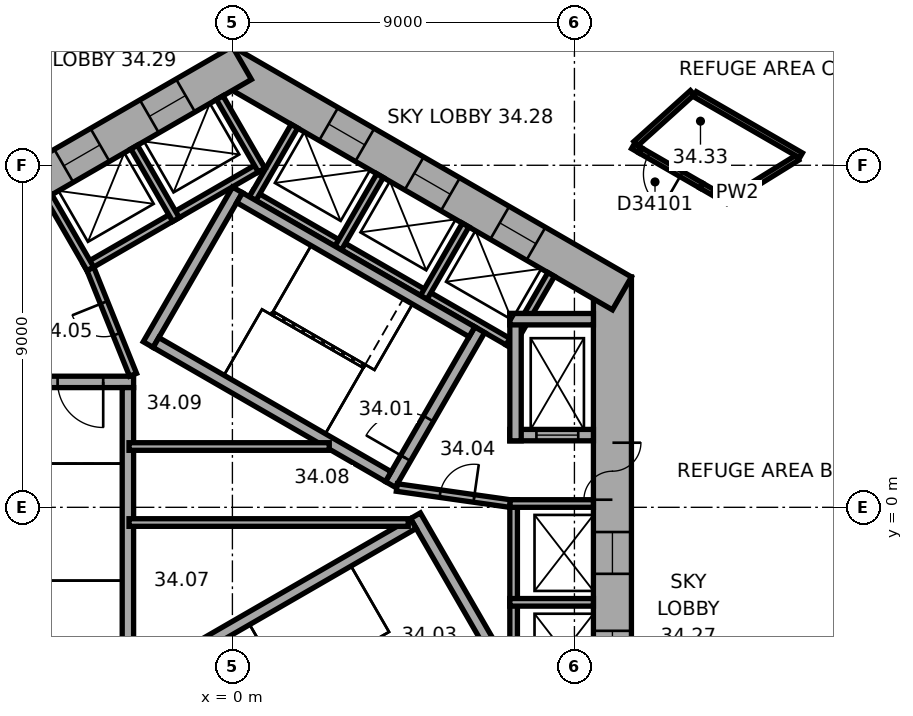
"""IFC4 building model, lengths in metres.
Left out: names, types, materials, properties, quantities, classifications, styles, units other than length and angle.
Written with IfcOpenShell. Run it as: python <this file> out.ifc"""

import sys

from ifc_helpers import new_model, si_unit, direction, frame, frame_2d, origin, place, context, subcontext, project, spatial, rectangle, extrude, element, fill, save


model = new_model("IFC4")
c1 = context("Model", 3, precision=1e-05, world=origin(), true_north=direction((0.0, 1.0)))
c2 = subcontext(c1, "Body", "Model", "MODEL_VIEW")
j1 = project(units=[si_unit("LENGTHUNIT", "METRE"), si_unit("PLANEANGLEUNIT", "RADIAN")], contexts=[c1])
p1 = place(None, origin())
s1 = spatial("IfcSite", under=j1, at=p1, CompositionType="ELEMENT")
p2 = place(p1, origin())
s2 = spatial("IfcBuilding", under=s1, at=p2, CompositionType="ELEMENT")
p3 = place(p2, frame((0.0, 0.0, 139.2)))
s3 = spatial("IfcBuildingStorey", under=s2, at=p3, CompositionType="ELEMENT", Elevation=139.2)
p4 = place(p3, frame((10.0, -6.062, 0.0), z_axis=(0.0, 0.0, 1.0), x_axis=(0.0, 1.0, 0.0)))
e1 = element("IfcWall", 1, at=p4, inside=s3, PredefinedType="SHEAR", context=c2, shape_type="SweptSolid", body=[
    extrude(rectangle(XDim=12.125, YDim=1.0, at=frame_2d((6.062, 0.0))), origin(), (0.0, 0.0, 1.0), 7.4),
])
p5 = place(p4, frame((6.262, 0.0, 0.0)))
e2 = element("IfcOpeningElement", 2, at=p5, cuts=e1, PredefinedType="OPENING", context=c2, shape_type="SweptSolid", body=[
    extrude(rectangle(XDim=1.5, YDim=2.1, at=frame_2d((0.75, 1.05))), frame((0.0, 0.51, 0.0), z_axis=(0.0, -1.0, 0.0), x_axis=(1.0, 0.0, 0.0)), (0.0, 0.0, 1.0), 1.02),
])
p6 = place(p4, frame((1.712, 0.0, 0.0)))
e3 = element("IfcOpeningElement", 3, at=p6, cuts=e1, PredefinedType="OPENING", context=c2, shape_type="SweptSolid", body=[
    extrude(rectangle(XDim=1.1, YDim=2.1, at=frame_2d((0.55, 1.05))), frame((0.0, 0.51, 0.0), z_axis=(0.0, -1.0, 0.0), x_axis=(1.0, 0.0, 0.0)), (0.0, 0.0, 1.0), 1.02),
])
p7 = place(p4, frame((4.312, 0.0, 0.0)))
e4 = element("IfcOpeningElement", 4, at=p7, cuts=e1, PredefinedType="OPENING", context=c2, shape_type="SweptSolid", body=[
    extrude(rectangle(XDim=1.1, YDim=2.1, at=frame_2d((0.55, 1.05))), frame((0.0, 0.51, 0.0), z_axis=(0.0, -1.0, 0.0), x_axis=(1.0, 0.0, 0.0)), (0.0, 0.0, 1.0), 1.02),
])
p8 = place(p3, frame((10.25, 5.629, 0.0), z_axis=(0.0, 0.0, 1.0), x_axis=(-0.866022616891, 0.50000482701, 0.0)))
e5 = element("IfcWall", 5, at=p8, inside=s3, PredefinedType="SHEAR", context=c2, shape_type="SweptSolid", body=[
    extrude(rectangle(XDim=12.125, YDim=1.0, at=frame_2d((6.062, 0.0))), origin(), (0.0, 0.0, 1.0), 7.4),
])
p9 = place(p8, frame((2.612, 0.0, 0.0)))
e6 = element("IfcOpeningElement", 6, at=p9, cuts=e5, PredefinedType="OPENING", context=c2, shape_type="SweptSolid", body=[
    extrude(rectangle(XDim=1.1, YDim=2.1, at=frame_2d((0.55, 1.05))), frame((0.0, 0.51, 0.0), z_axis=(0.0, -1.0, 0.0), x_axis=(1.0, 0.0, 0.0)), (0.0, 0.0, 1.0), 1.02),
])
p10 = place(p8, frame((5.212, 0.0, 0.0)))
e7 = element("IfcOpeningElement", 7, at=p10, cuts=e5, PredefinedType="OPENING", context=c2, shape_type="SweptSolid", body=[
    extrude(rectangle(XDim=1.1, YDim=2.1, at=frame_2d((0.55, 1.05))), frame((0.0, 0.51, 0.0), z_axis=(0.0, -1.0, 0.0), x_axis=(1.0, 0.0, 0.0)), (0.0, 0.0, 1.0), 1.02),
])
p11 = place(p8, frame((7.812, 0.0, 0.0)))
e8 = element("IfcOpeningElement", 8, at=p11, cuts=e5, PredefinedType="OPENING", context=c2, shape_type="SweptSolid", body=[
    extrude(rectangle(XDim=1.1, YDim=2.1, at=frame_2d((0.55, 1.05))), frame((0.0, 0.51, 0.0), z_axis=(0.0, -1.0, 0.0), x_axis=(1.0, 0.0, 0.0)), (0.0, 0.0, 1.0), 1.02),
])
p12 = place(p3, frame((0.25, 11.691, 0.0), z_axis=(0.0, 0.0, 1.0), x_axis=(-0.866022616891, -0.50000482701, 0.0)))
e9 = element("IfcWall", 9, at=p12, inside=s3, PredefinedType="SHEAR", context=c2, shape_type="SweptSolid", body=[
    extrude(rectangle(XDim=12.125, YDim=1.0, at=frame_2d((6.062, 0.0))), origin(), (0.0, 0.0, 1.0), 7.4),
])
p13 = place(p12, frame((6.262, 0.0, 0.0)))
e10 = element("IfcOpeningElement", 10, at=p13, cuts=e9, PredefinedType="OPENING", context=c2, shape_type="SweptSolid", body=[
    extrude(rectangle(XDim=1.5, YDim=2.1, at=frame_2d((0.75, 1.05))), frame((0.0, 0.51, 0.0), z_axis=(0.0, -1.0, 0.0), x_axis=(1.0, 0.0, 0.0)), (0.0, 0.0, 1.0), 1.02),
])
p14 = place(p12, frame((1.712, 0.0, 0.0)))
e11 = element("IfcOpeningElement", 11, at=p14, cuts=e9, PredefinedType="OPENING", context=c2, shape_type="SweptSolid", body=[
    extrude(rectangle(XDim=1.1, YDim=2.1, at=frame_2d((0.55, 1.05))), frame((0.0, 0.51, 0.0), z_axis=(0.0, -1.0, 0.0), x_axis=(1.0, 0.0, 0.0)), (0.0, 0.0, 1.0), 1.02),
])
p15 = place(p12, frame((4.312, 0.0, 0.0)))
e12 = element("IfcOpeningElement", 12, at=p15, cuts=e9, PredefinedType="OPENING", context=c2, shape_type="SweptSolid", body=[
    extrude(rectangle(XDim=1.1, YDim=2.1, at=frame_2d((0.55, 1.05))), frame((0.0, 0.51, 0.0), z_axis=(0.0, -1.0, 0.0), x_axis=(1.0, 0.0, 0.0)), (0.0, 0.0, 1.0), 1.02),
])
p16 = place(p3, frame((-15.687, 8.062, 0.0), z_axis=(0.0, 0.0, 1.0), x_axis=(0.856487923842, 0.516167062406, 0.0)))
e13 = element("IfcWall", 13, at=p16, inside=s3, PredefinedType="STANDARD", context=c2, shape_type="SweptSolid", body=[
    extrude(rectangle(XDim=15.973, YDim=0.15, at=frame_2d((7.987, 0.0))), origin(), (0.0, 0.0, 1.0), 2.6),
])
p17 = place(p16, frame((3.093, 0.0, 0.0)))
e14 = element("IfcOpeningElement", 14, at=p17, cuts=e13, PredefinedType="OPENING", context=c2, shape_type="SweptSolid", body=[
    extrude(rectangle(XDim=1.8, YDim=2.4, at=frame_2d((0.9, 1.2))), frame((0.0, 0.085, 0.0), z_axis=(0.0, -1.0, 0.0), x_axis=(1.0, 0.0, 0.0)), (0.0, 0.0, 1.0), 0.17),
])
p18 = place(p16, frame((11.08, 0.0, 0.0)))
e15 = element("IfcOpeningElement", 15, at=p18, cuts=e13, PredefinedType="OPENING", context=c2, shape_type="SweptSolid", body=[
    extrude(rectangle(XDim=1.8, YDim=2.4, at=frame_2d((0.9, 1.2))), frame((0.0, 0.085, 0.0), z_axis=(0.0, -1.0, 0.0), x_axis=(1.0, 0.0, 0.0)), (0.0, 0.0, 1.0), 0.17),
])
p19 = place(p3, frame((7.4, -5.2, 0.0), z_axis=(0.0, 0.0, 1.0), x_axis=(0.0, 1.0, 0.0)))
e16 = element("IfcWall", 16, at=p19, inside=s3, PredefinedType="PARTITIONING", context=c2, shape_type="SweptSolid", body=[
    extrude(rectangle(XDim=5.4, YDim=0.2, at=frame_2d((2.7, 0.0))), origin(), (0.0, 0.0, 1.0), 7.12),
])
for number, where, z_axis, x_axis in (
    (17, (7.3, -2.5, 0.0), (0.0, 0.0, 1.0), (1.0, 0.0, 0.0)),
    (18, (7.3, 0.1, 0.0), (0.0, 0.0, 1.0), (1.0, 0.0, 0.0)),
):
    element("IfcWall", number, at=place(p3, frame(where, z_axis=z_axis, x_axis=x_axis)), inside=s3, PredefinedType="PARTITIONING", context=c2, shape_type="SweptSolid", body=[
        extrude(rectangle(XDim=2.2, YDim=0.2, at=frame_2d((1.1, 0.0))), origin(), (0.0, 0.0, 1.0), 7.12),
    ])
p20 = place(p3, frame((7.424, 4.259, 0.0), z_axis=(0.0, 0.0, 1.0), x_axis=(-0.866026010844, 0.49999894854, 0.0)))
e19 = element("IfcWall", 19, at=p20, inside=s3, PredefinedType="PARTITIONING", context=c2, shape_type="SweptSolid", body=[
    extrude(rectangle(XDim=8.0, YDim=0.2, at=frame_2d((4.0, 0.0))), origin(), (0.0, 0.0, 1.0), 7.12),
])
for number, where, z_axis, x_axis in (
    (20, (7.287, 4.222, 0.0), (0.0, 0.0, 1.0), (0.5, 0.866, 0.0)),
    (21, (5.036, 5.522, 0.0), (0.0, 0.0, 1.0), (0.5, 0.866, 0.0)),
    (22, (2.784, 6.822, 0.0), (0.0, 0.0, 1.0), (0.5, 0.866, 0.0)),
    (23, (0.532, 8.122, 0.0), (0.0, 0.0, 1.0), (0.5, 0.866, 0.0)),
):
    element("IfcWall", number, at=place(p3, frame(where, z_axis=z_axis, x_axis=x_axis)), inside=s3, PredefinedType="PARTITIONING", context=c2, shape_type="SweptSolid", body=[
        extrude(rectangle(XDim=2.2, YDim=0.2, at=frame_2d((1.1, 0.0))), origin(), (0.0, 0.0, 1.0), 7.12),
    ])
p21 = place(p3, frame((0.803, 9.009, 0.0), z_axis=(0.0, 0.0, 1.0), x_axis=(-0.866028230842, -0.499995103361, 0.0)))
e24 = element("IfcWall", 24, at=p21, inside=s3, PredefinedType="PARTITIONING", context=c2, shape_type="SweptSolid", body=[
    extrude(rectangle(XDim=5.4, YDim=0.2, at=frame_2d((2.7, 0.0))), origin(), (0.0, 0.0, 1.0), 7.12),
])
p22 = place(p3, frame((0.767, 8.872, 0.0), z_axis=(0.0, 0.0, 1.0), x_axis=(-0.499994660107, 0.866028486751, 0.0)))
e25 = element("IfcWall", 25, at=p22, inside=s3, PredefinedType="PARTITIONING", context=c2, shape_type="SweptSolid", body=[
    extrude(rectangle(XDim=2.2, YDim=0.2, at=frame_2d((1.1, 0.0))), origin(), (0.0, 0.0, 1.0), 7.12),
])
for number, where, z_axis, x_axis in (
    (26, (-1.485, 7.572, 0.0), (0.0, 0.0, 1.0), (-0.5, 0.866, 0.0)),
    (27, (-3.737, 6.272, 0.0), (0.0, 0.0, 1.0), (-0.5, 0.866, 0.0)),
):
    element("IfcWall", number, at=place(p3, frame(where, z_axis=z_axis, x_axis=x_axis)), inside=s3, PredefinedType="PARTITIONING", context=c2, shape_type="SweptSolid", body=[
        extrude(rectangle(XDim=2.2, YDim=0.2, at=frame_2d((1.1, 0.0))), origin(), (0.0, 0.0, 1.0), 7.12),
    ])
p23 = place(p3, frame((4.158, 0.602, 0.0), z_axis=(0.0, 0.0, 1.0), x_axis=(0.499977259774, 0.866038532462, 0.0)))
e28 = element("IfcWall", 28, at=p23, inside=s3, PredefinedType="SHEAR", context=c2, shape_type="SweptSolid", body=[
    extrude(rectangle(XDim=4.7, YDim=0.3, at=frame_2d((2.35, 0.0))), origin(), (0.0, 0.0, 1.0), 7.12),
])
p24 = place(p23, frame((0.8, 0.0, 0.0)))
e29 = element("IfcOpeningElement", 29, at=p24, cuts=e28, PredefinedType="OPENING", context=c2, shape_type="SweptSolid", body=[
    extrude(rectangle(XDim=1.2, YDim=2.1, at=frame_2d((0.6, 1.05))), frame((0.0, 0.16, 0.0), z_axis=(0.0, -1.0, 0.0), x_axis=(1.0, 0.0, 0.0)), (0.0, 0.0, 1.0), 0.32),
])
p25 = place(p3, frame((-2.216, 4.282, 0.0), z_axis=(0.0, 0.0, 1.0), x_axis=(0.499977259774, 0.866038532462, 0.0)))
e30 = element("IfcWall", 30, at=p25, inside=s3, PredefinedType="SHEAR", context=c2, shape_type="SweptSolid", body=[
    extrude(rectangle(XDim=4.7, YDim=0.3, at=frame_2d((2.35, 0.0))), origin(), (0.0, 0.0, 1.0), 7.12),
])
for number, where, z_axis, x_axis in (
    (31, (4.103, 0.807, 0.0), (0.0, 0.0, 1.0), (-0.866, 0.5, 0.0)),
    (32, (6.303, 4.617, 0.0), (0.0, 0.0, 1.0), (-0.866, 0.5, 0.0)),
):
    element("IfcWall", number, at=place(p3, frame(where, z_axis=z_axis, x_axis=x_axis)), inside=s3, PredefinedType="SHEAR", context=c2, shape_type="SweptSolid", body=[
        extrude(rectangle(XDim=7.06, YDim=0.3, at=frame_2d((3.53, 0.0))), origin(), (0.0, 0.0, 1.0), 7.12),
    ])
p26 = place(p3, frame((-2.6, 3.3, 0.0), z_axis=(0.0, 0.0, 1.0), x_axis=(-1.0, 0.0, 0.0)))
e33 = element("IfcWall", 33, at=p26, inside=s3, PredefinedType="SHEAR", context=c2, shape_type="SweptSolid", body=[
    extrude(rectangle(XDim=4.7, YDim=0.3, at=frame_2d((2.35, 0.0))), origin(), (0.0, 0.0, 1.0), 7.12),
])
p27 = place(p26, frame((0.8, 0.0, 0.0)))
e34 = element("IfcOpeningElement", 34, at=p27, cuts=e33, PredefinedType="OPENING", context=c2, shape_type="SweptSolid", body=[
    extrude(rectangle(XDim=1.2, YDim=2.1, at=frame_2d((0.6, 1.05))), frame((0.0, 0.16, 0.0), z_axis=(0.0, -1.0, 0.0), x_axis=(1.0, 0.0, 0.0)), (0.0, 0.0, 1.0), 0.32),
])
p28 = place(p3, frame((-2.75, 3.15, 0.0), z_axis=(0.0, 0.0, 1.0), x_axis=(0.0, -1.0, 0.0)))
e35 = element("IfcWall", 35, at=p28, inside=s3, PredefinedType="SHEAR", context=c2, shape_type="SweptSolid", body=[
    extrude(rectangle(XDim=7.06, YDim=0.3, at=frame_2d((3.53, 0.0))), origin(), (0.0, 0.0, 1.0), 7.12),
])
p29 = place(p3, frame((4.816, -0.222, 0.0), z_axis=(0.0, 0.0, 1.0), x_axis=(0.499977259774, -0.866038532462, 0.0)))
e36 = element("IfcWall", 36, at=p29, inside=s3, PredefinedType="SHEAR", context=c2, shape_type="SweptSolid", body=[
    extrude(rectangle(XDim=4.7, YDim=0.3, at=frame_2d((2.35, 0.0))), origin(), (0.0, 0.0, 1.0), 7.12),
])
p30 = place(p3, frame((-1.353, -3.957, 0.0), z_axis=(0.0, 0.0, 1.0), x_axis=(0.866027801685, 0.499995846692, 0.0)))
e37 = element("IfcWall", 37, at=p30, inside=s3, PredefinedType="SHEAR", context=c2, shape_type="SweptSolid", body=[
    extrude(rectangle(XDim=7.06, YDim=0.3, at=frame_2d((3.53, 0.0))), origin(), (0.0, 0.0, 1.0), 7.12),
])
p31 = place(p3, frame((7.3, 1.9, 0.0), z_axis=(0.0, 0.0, 1.0), x_axis=(1.0, 0.0, 0.0)))
e38 = element("IfcWall", 38, at=p31, inside=s3, PredefinedType="SHEAR", context=c2, shape_type="SweptSolid", body=[
    extrude(rectangle(XDim=2.2, YDim=0.3, at=frame_2d((1.1, 0.0))), origin(), (0.0, 0.0, 1.0), 7.12),
])
p32 = place(p31, frame((0.7, 0.0, 0.0)))
e39 = element("IfcOpeningElement", 39, at=p32, cuts=e38, PredefinedType="OPENING", context=c2, shape_type="SweptSolid", body=[
    extrude(rectangle(XDim=1.1, YDim=2.1, at=frame_2d((0.55, 1.05))), frame((0.0, 0.16, 0.0), z_axis=(0.0, -1.0, 0.0), x_axis=(1.0, 0.0, 0.0)), (0.0, 0.0, 1.0), 0.32),
])
p33 = place(p3, frame((7.45, 1.75, 0.0), z_axis=(0.0, 0.0, 1.0), x_axis=(0.0, 1.0, 0.0)))
e40 = element("IfcWall", 40, at=p33, inside=s3, PredefinedType="SHEAR", context=c2, shape_type="SweptSolid", body=[
    extrude(rectangle(XDim=3.35, YDim=0.3, at=frame_2d((1.675, 0.0))), origin(), (0.0, 0.0, 1.0), 7.12),
])
p34 = place(p3, frame((7.3, 4.95, 0.0), z_axis=(0.0, 0.0, 1.0), x_axis=(1.0, 0.0, 0.0)))
e41 = element("IfcWall", 41, at=p34, inside=s3, PredefinedType="SHEAR", context=c2, shape_type="SweptSolid", body=[
    extrude(rectangle(XDim=2.2, YDim=0.3, at=frame_2d((1.1, 0.0))), origin(), (0.0, 0.0, 1.0), 7.12),
])
p35 = place(p3, frame((4.327, 0.521, 0.0), z_axis=(0.0, 0.0, 1.0), x_axis=(0.990124376366, -0.14019172346, 0.0)))
e42 = element("IfcWall", 42, at=p35, inside=s3, PredefinedType="PARTITIONING", context=c2, shape_type="SweptSolid", body=[
    extrude(rectangle(XDim=3.002, YDim=0.2, at=frame_2d((1.501, 0.0))), origin(), (0.0, 0.0, 1.0), 7.12),
])
p36 = place(p35, frame((1.15, 0.0, 0.0)))
e43 = element("IfcOpeningElement", 43, at=p36, cuts=e42, PredefinedType="OPENING", context=c2, shape_type="SweptSolid", body=[
    extrude(rectangle(XDim=0.9, YDim=2.1, at=frame_2d((0.45, 1.05))), frame((0.0, 0.11, 0.0), z_axis=(0.0, -1.0, 0.0), x_axis=(1.0, 0.0, 0.0)), (0.0, 0.0, 1.0), 0.22),
])
p37 = place(p3, frame((-2.615, 3.487, 0.0), z_axis=(0.0, 0.0, 1.0), x_axis=(-0.373576831041, 0.92759924068, 0.0)))
e44 = element("IfcWall", 44, at=p37, inside=s3, PredefinedType="PARTITIONING", context=c2, shape_type="SweptSolid", body=[
    extrude(rectangle(XDim=3.002, YDim=0.2, at=frame_2d((1.501, 0.0))), origin(), (0.0, 0.0, 1.0), 7.12),
])
p38 = place(p37, frame((1.15, 0.0, 0.0)))
e45 = element("IfcOpeningElement", 45, at=p38, cuts=e44, PredefinedType="OPENING", context=c2, shape_type="SweptSolid", body=[
    extrude(rectangle(XDim=0.9, YDim=2.1, at=frame_2d((0.45, 1.05))), frame((0.0, 0.11, 0.0), z_axis=(0.0, -1.0, 0.0), x_axis=(1.0, 0.0, 0.0)), (0.0, 0.0, 1.0), 0.22),
])
p39 = place(p3, frame((-2.72, -0.4, 0.0), z_axis=(0.0, 0.0, 1.0), x_axis=(1.0, 0.0, 0.0)))
e46 = element("IfcWall", 46, at=p39, inside=s3, PredefinedType="PARTITIONING", context=c2, shape_type="SweptSolid", body=[
    extrude(rectangle(XDim=7.347, YDim=0.2, at=frame_2d((3.674, 0.0))), origin(), (0.0, 0.0, 1.0), 7.12),
])
p40 = place(p3, frame((-2.72, 1.6, 0.0), z_axis=(0.0, 0.0, 1.0), x_axis=(1.0, 0.0, 0.0)))
e47 = element("IfcWall", 47, at=p40, inside=s3, PredefinedType="PARTITIONING", context=c2, shape_type="SweptSolid", body=[
    extrude(rectangle(XDim=5.269, YDim=0.2, at=frame_2d((2.634, 0.0))), origin(), (0.0, 0.0, 1.0), 7.12),
])
p41 = place(p3, frame((13.032, 8.064, 0.0), z_axis=(0.0, 0.0, 1.0), x_axis=(-0.865926680471, 0.500170954823, 0.0)))
e48 = element("IfcWall", 48, at=p41, inside=s3, PredefinedType="PARTITIONING", context=c2, shape_type="SweptSolid", body=[
    extrude(rectangle(XDim=0.801, YDim=0.15, at=frame_2d((0.4, 0.0))), origin(), (0.0, 0.0, 1.0), 7.12),
])
p42 = place(p3, frame((12.338, 8.465, 0.0), z_axis=(0.0, 0.0, 1.0), x_axis=(-0.866111002094, 0.499851710062, 0.0)))
e49 = element("IfcWall", 49, at=p42, inside=s3, PredefinedType="PARTITIONING", context=c2, shape_type="SweptSolid", body=[
    extrude(rectangle(XDim=1.853, YDim=0.15, at=frame_2d((0.927, 0.0))), origin(), (0.0, 0.0, 1.0), 7.12),
])
p43 = place(p42, frame((0.603, 0.0, 0.0)))
e50 = element("IfcOpeningElement", 50, at=p43, cuts=e49, PredefinedType="OPENING", context=c2, shape_type="SweptSolid", body=[
    extrude(rectangle(XDim=1.0, YDim=2.1, at=frame_2d((0.5, 1.05))), frame((0.0, 0.085, 0.0), z_axis=(0.0, -1.0, 0.0), x_axis=(1.0, 0.0, 0.0)), (0.0, 0.0, 1.0), 0.17),
])
p44 = place(p3, frame((14.86, 9.196, 0.0), z_axis=(0.0, 0.0, 1.0), x_axis=(-0.850404527443, -0.526129394451, 0.0)))
e51 = element("IfcWall", 51, at=p44, inside=s3, PredefinedType="PARTITIONING", context=c2, shape_type="SweptSolid", body=[
    extrude(rectangle(XDim=2.09, YDim=0.15, at=frame_2d((1.045, 0.0))), origin(), (0.0, 0.0, 1.0), 7.12),
])
p45 = place(p3, frame((10.733, 9.391, 0.0), z_axis=(0.0, 0.0, 1.0), x_axis=(-0.866002566612, 0.500039553057, 0.0)))
e52 = element("IfcWall", 52, at=p45, inside=s3, PredefinedType="PARTITIONING", context=c2, shape_type="SweptSolid", body=[
    extrude(rectangle(XDim=0.222, YDim=0.15, at=frame_2d((0.111, 0.0))), origin(), (0.0, 0.0, 1.0), 7.12),
])
p46 = place(p3, frame((10.615, 9.57, 0.0), z_axis=(0.0, 0.0, 1.0), x_axis=(0.742681485431, 0.669644839597, 0.0)))
e53 = element("IfcWall", 53, at=p46, inside=s3, PredefinedType="PARTITIONING", context=c2, shape_type="SweptSolid", body=[
    extrude(rectangle(XDim=2.002, YDim=0.15, at=frame_2d((1.001, 0.0))), origin(), (0.0, 0.0, 1.0), 7.12),
])
p47 = place(p3, frame((12.172, 10.871, 0.0), z_axis=(0.0, 0.0, 1.0), x_axis=(0.86596351105, -0.500107186041, 0.0)))
e54 = element("IfcWall", 54, at=p47, inside=s3, PredefinedType="PARTITIONING", context=c2, shape_type="SweptSolid", body=[
    extrude(rectangle(XDim=3.222, YDim=0.15, at=frame_2d((1.611, 0.0))), origin(), (0.0, 0.0, 1.0), 7.12),
])
p48 = place(p5, origin())
e55 = element("IfcDoor", 55, at=p48, inside=s3, OperationType="DOUBLE_DOOR_SINGLE_SWING", PredefinedType="DOOR", context=c2, shape_type="SweptSolid", body=[
    extrude(rectangle(XDim=1.5, YDim=2.1, at=frame_2d((0.75, 1.05))), frame((0.0, 0.025, 0.0), z_axis=(0.0, -1.0, 0.0), x_axis=(1.0, 0.0, 0.0)), (0.0, 0.0, 1.0), 0.05),
])
fill(e2, e55)
p49 = place(p24, origin())
e56 = element("IfcDoor", 56, at=p49, inside=s3, OperationType="SINGLE_SWING_RIGHT", PredefinedType="DOOR", context=c2, shape_type="SweptSolid", body=[
    extrude(rectangle(XDim=1.2, YDim=2.1, at=frame_2d((0.6, 1.05))), frame((0.0, 0.025, 0.0), z_axis=(0.0, -1.0, 0.0), x_axis=(1.0, 0.0, 0.0)), (0.0, 0.0, 1.0), 0.05),
])
fill(e29, e56)
p50 = place(p27, origin())
e57 = element("IfcDoor", 57, at=p50, inside=s3, OperationType="SINGLE_SWING_RIGHT", PredefinedType="DOOR", context=c2, shape_type="SweptSolid", body=[
    extrude(rectangle(XDim=1.2, YDim=2.1, at=frame_2d((0.6, 1.05))), frame((0.0, 0.025, 0.0), z_axis=(0.0, -1.0, 0.0), x_axis=(1.0, 0.0, 0.0)), (0.0, 0.0, 1.0), 0.05),
])
fill(e34, e57)
p51 = place(p36, origin())
e58 = element("IfcDoor", 58, at=p51, inside=s3, OperationType="SINGLE_SWING_LEFT", PredefinedType="DOOR", context=c2, shape_type="SweptSolid", body=[
    extrude(rectangle(XDim=0.9, YDim=2.1, at=frame_2d((0.45, 1.05))), frame((0.0, 0.025, 0.0), z_axis=(0.0, -1.0, 0.0), x_axis=(1.0, 0.0, 0.0)), (0.0, 0.0, 1.0), 0.05),
])
fill(e43, e58)
p52 = place(p38, origin())
e59 = element("IfcDoor", 59, at=p52, inside=s3, OperationType="SINGLE_SWING_LEFT", PredefinedType="DOOR", context=c2, shape_type="SweptSolid", body=[
    extrude(rectangle(XDim=0.9, YDim=2.1, at=frame_2d((0.45, 1.05))), frame((0.0, 0.025, 0.0), z_axis=(0.0, -1.0, 0.0), x_axis=(1.0, 0.0, 0.0)), (0.0, 0.0, 1.0), 0.05),
])
fill(e45, e59)
p53 = place(p32, origin())
e60 = element("IfcDoor", 60, at=p53, inside=s3, OperationType="DOUBLE_DOOR_SLIDING", PredefinedType="DOOR", context=c2, shape_type="SweptSolid", body=[
    extrude(rectangle(XDim=1.1, YDim=2.1, at=frame_2d((0.55, 1.05))), frame((0.0, 0.025, 0.0), z_axis=(0.0, -1.0, 0.0), x_axis=(1.0, 0.0, 0.0)), (0.0, 0.0, 1.0), 0.05),
])
fill(e39, e60)
p54 = place(p6, origin())
e61 = element("IfcDoor", 61, at=p54, inside=s3, OperationType="DOUBLE_DOOR_SLIDING", PredefinedType="DOOR", context=c2, shape_type="SweptSolid", body=[
    extrude(rectangle(XDim=1.1, YDim=2.1, at=frame_2d((0.55, 1.05))), frame((0.0, 0.025, 0.0), z_axis=(0.0, -1.0, 0.0), x_axis=(1.0, 0.0, 0.0)), (0.0, 0.0, 1.0), 0.05),
])
fill(e3, e61)
p55 = place(p7, origin())
e62 = element("IfcDoor", 62, at=p55, inside=s3, OperationType="DOUBLE_DOOR_SLIDING", PredefinedType="DOOR", context=c2, shape_type="SweptSolid", body=[
    extrude(rectangle(XDim=1.1, YDim=2.1, at=frame_2d((0.55, 1.05))), frame((0.0, 0.025, 0.0), z_axis=(0.0, -1.0, 0.0), x_axis=(1.0, 0.0, 0.0)), (0.0, 0.0, 1.0), 0.05),
])
fill(e4, e62)
p56 = place(p9, origin())
e63 = element("IfcDoor", 63, at=p56, inside=s3, OperationType="DOUBLE_DOOR_SLIDING", PredefinedType="DOOR", context=c2, shape_type="SweptSolid", body=[
    extrude(rectangle(XDim=1.1, YDim=2.1, at=frame_2d((0.55, 1.05))), frame((0.0, 0.025, 0.0), z_axis=(0.0, -1.0, 0.0), x_axis=(1.0, 0.0, 0.0)), (0.0, 0.0, 1.0), 0.05),
])
fill(e6, e63)
p57 = place(p10, origin())
e64 = element("IfcDoor", 64, at=p57, inside=s3, OperationType="DOUBLE_DOOR_SLIDING", PredefinedType="DOOR", context=c2, shape_type="SweptSolid", body=[
    extrude(rectangle(XDim=1.1, YDim=2.1, at=frame_2d((0.55, 1.05))), frame((0.0, 0.025, 0.0), z_axis=(0.0, -1.0, 0.0), x_axis=(1.0, 0.0, 0.0)), (0.0, 0.0, 1.0), 0.05),
])
fill(e7, e64)
p58 = place(p11, origin())
e65 = element("IfcDoor", 65, at=p58, inside=s3, OperationType="DOUBLE_DOOR_SLIDING", PredefinedType="DOOR", context=c2, shape_type="SweptSolid", body=[
    extrude(rectangle(XDim=1.1, YDim=2.1, at=frame_2d((0.55, 1.05))), frame((0.0, 0.025, 0.0), z_axis=(0.0, -1.0, 0.0), x_axis=(1.0, 0.0, 0.0)), (0.0, 0.0, 1.0), 0.05),
])
fill(e8, e65)
p59 = place(p14, origin())
e66 = element("IfcDoor", 66, at=p59, inside=s3, OperationType="DOUBLE_DOOR_SLIDING", PredefinedType="DOOR", context=c2, shape_type="SweptSolid", body=[
    extrude(rectangle(XDim=1.1, YDim=2.1, at=frame_2d((0.55, 1.05))), frame((0.0, 0.025, 0.0), z_axis=(0.0, -1.0, 0.0), x_axis=(1.0, 0.0, 0.0)), (0.0, 0.0, 1.0), 0.05),
])
fill(e11, e66)
p60 = place(p15, origin())
e67 = element("IfcDoor", 67, at=p60, inside=s3, OperationType="DOUBLE_DOOR_SLIDING", PredefinedType="DOOR", context=c2, shape_type="SweptSolid", body=[
    extrude(rectangle(XDim=1.1, YDim=2.1, at=frame_2d((0.55, 1.05))), frame((0.0, 0.025, 0.0), z_axis=(0.0, -1.0, 0.0), x_axis=(1.0, 0.0, 0.0)), (0.0, 0.0, 1.0), 0.05),
])
fill(e12, e67)
p61 = place(p43, origin())
e68 = element("IfcDoor", 68, at=p61, inside=s3, OperationType="SINGLE_SWING_LEFT", PredefinedType="DOOR", context=c2, shape_type="SweptSolid", body=[
    extrude(rectangle(XDim=1.0, YDim=2.1, at=frame_2d((0.5, 1.05))), frame((0.0, 0.025, 0.0), z_axis=(0.0, -1.0, 0.0), x_axis=(1.0, 0.0, 0.0)), (0.0, 0.0, 1.0), 0.05),
])
fill(e50, e68)
save(model, sys.argv[1])
